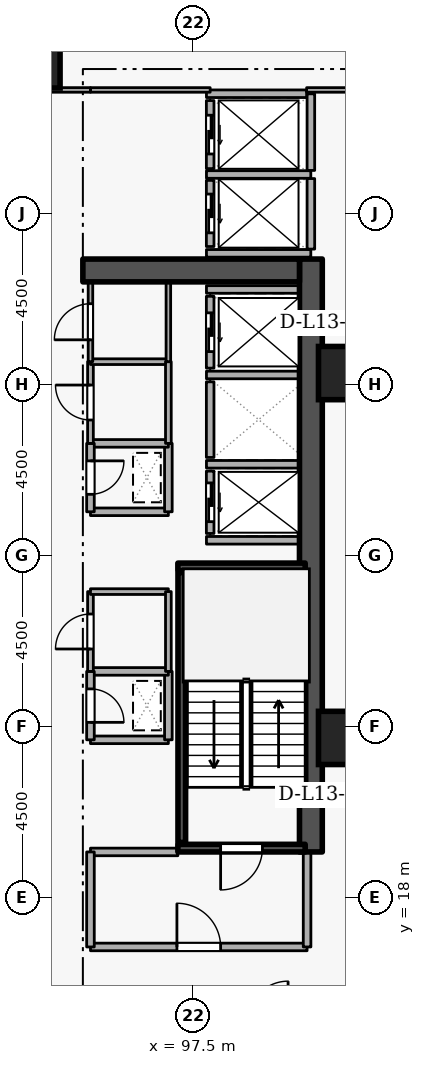
"""IFC4 building model, lengths in metres.
Left out: names, types, materials, properties, quantities, classifications, styles, units other than length and angle.
Written with IfcOpenShell. Run it as: python <this file> out.ifc"""

import sys

from ifc_helpers import new_model, si_unit, direction, frame, frame_2d, origin, origin_2d, place, context, subcontext, project, spatial, rectangle, extrude, element, fill, save


model = new_model("IFC4")
c1 = context("Model", 3, precision=1e-05, world=origin(), true_north=direction((0.0, 1.0)))
c2 = subcontext(c1, "Body", "Model", "MODEL_VIEW")
j1 = project(units=[si_unit("LENGTHUNIT", "METRE"), si_unit("PLANEANGLEUNIT", "RADIAN")], contexts=[c1])
p1 = place(None, origin())
s1 = spatial("IfcSite", under=j1, at=p1, CompositionType="ELEMENT")
p2 = place(p1, origin())
s2 = spatial("IfcBuilding", under=s1, at=p2, CompositionType="ELEMENT")
p3 = place(p2, frame((0.0, 0.0, 53.7)))
s3 = spatial("IfcBuildingStorey", under=s2, at=p3, CompositionType="ELEMENT", Elevation=53.7)
p4 = place(p3, frame((100.6, 19.2, 0.0), z_axis=(0.0, 0.0, 1.0), x_axis=(0.0, 1.0, 0.0)))
e1 = element("IfcWall", 1, at=p4, inside=s3, PredefinedType="SHEAR", context=c2, shape_type="SweptSolid", body=[
    extrude(rectangle(XDim=15.6, YDim=0.6, at=frame_2d((7.8, 0.0))), origin(), (0.0, 0.0, 1.0), 3.6),
])
p5 = place(p3, frame((94.6, 34.5, 0.0), z_axis=(0.0, 0.0, 1.0), x_axis=(1.0, 0.0, 0.0)))
e2 = element("IfcWall", 2, at=p5, inside=s3, PredefinedType="SHEAR", context=c2, shape_type="SweptSolid", body=[
    extrude(rectangle(XDim=5.7, YDim=0.6, at=frame_2d((2.85, 0.0))), origin(), (0.0, 0.0, 1.0), 3.6),
])
for number, where, z_axis, x_axis in (
    (3, (93.3, 40.0, 0.0), (0.0, 0.0, 1.0), (1.0, 0.0, 0.0)),
    (4, (101.5, 22.2, 0.0), (0.0, 0.0, 1.0), (1.0, 0.0, 0.0)),
    (5, (101.5, 31.8, 0.0), (0.0, 0.0, 1.0), (1.0, 0.0, 0.0)),
):
    element("IfcColumn", number, at=place(p3, frame(where, z_axis=z_axis, x_axis=x_axis)), inside=s3, PredefinedType="COLUMN", context=c2, shape_type="SweptSolid", body=[
        extrude(rectangle(XDim=1.4, YDim=1.4, at=origin_2d()), origin(), (0.0, 0.0, 1.0), 3.6),
    ])
p6 = place(p3, frame((97.95, 29.22, 0.0), z_axis=(0.0, 0.0, 1.0), x_axis=(0.0, -1.0, 0.0)))
e6 = element("IfcWall", 6, at=p6, inside=s3, PredefinedType="STANDARD", context=c2, shape_type="SweptSolid", body=[
    extrude(rectangle(XDim=1.64, YDim=0.2, at=frame_2d((0.82, 0.0))), origin(), (0.0, 0.0, 1.0), 3.34),
])
p7 = place(p6, frame((0.31, 0.0, 0.0)))
e7 = element("IfcOpeningElement", 7, at=p7, cuts=e6, PredefinedType="OPENING", context=c2, shape_type="SweptSolid", body=[
    extrude(rectangle(XDim=1.02, YDim=2.06, at=frame_2d((0.51, 1.03))), frame((0.0, 0.11, 0.0), z_axis=(0.0, -1.0, 0.0), x_axis=(1.0, 0.0, 0.0)), (0.0, 0.0, 1.0), 0.22),
])
p8 = place(p3, frame((97.95, 31.57, 0.0), z_axis=(0.0, 0.0, 1.0), x_axis=(0.0, -1.0, 0.0)))
e8 = element("IfcWall", 8, at=p8, inside=s3, PredefinedType="STANDARD", context=c2, shape_type="SweptSolid", body=[
    extrude(rectangle(XDim=1.99, YDim=0.2, at=frame_2d((0.995, 0.0))), origin(), (0.0, 0.0, 1.0), 3.34),
])
p9 = place(p3, frame((97.95, 33.82, 0.0), z_axis=(0.0, 0.0, 1.0), x_axis=(0.0, -1.0, 0.0)))
e9 = element("IfcWall", 9, at=p9, inside=s3, PredefinedType="STANDARD", context=c2, shape_type="SweptSolid", body=[
    extrude(rectangle(XDim=1.89, YDim=0.2, at=frame_2d((0.945, 0.0))), origin(), (0.0, 0.0, 1.0), 3.34),
])
p10 = place(p9, frame((0.435, 0.0, 0.0)))
e10 = element("IfcOpeningElement", 10, at=p10, cuts=e9, PredefinedType="OPENING", context=c2, shape_type="SweptSolid", body=[
    extrude(rectangle(XDim=1.02, YDim=2.06, at=frame_2d((0.51, 1.03))), frame((0.0, 0.11, 0.0), z_axis=(0.0, -1.0, 0.0), x_axis=(1.0, 0.0, 0.0)), (0.0, 0.0, 1.0), 0.22),
])
p11 = place(p3, frame((97.95, 36.87, 0.0), z_axis=(0.0, 0.0, 1.0), x_axis=(0.0, -1.0, 0.0)))
e11 = element("IfcWall", 11, at=p11, inside=s3, PredefinedType="STANDARD", context=c2, shape_type="SweptSolid", body=[
    extrude(rectangle(XDim=1.74, YDim=0.2, at=frame_2d((0.87, 0.0))), origin(), (0.0, 0.0, 1.0), 3.34),
])
p12 = place(p11, frame((0.36, 0.0, 0.0)))
e12 = element("IfcOpeningElement", 12, at=p12, cuts=e11, PredefinedType="OPENING", context=c2, shape_type="SweptSolid", body=[
    extrude(rectangle(XDim=1.02, YDim=2.06, at=frame_2d((0.51, 1.03))), frame((0.0, 0.11, 0.0), z_axis=(0.0, -1.0, 0.0), x_axis=(1.0, 0.0, 0.0)), (0.0, 0.0, 1.0), 0.22),
])
p13 = place(p3, frame((97.95, 38.97, 0.0), z_axis=(0.0, 0.0, 1.0), x_axis=(0.0, -1.0, 0.0)))
e13 = element("IfcWall", 13, at=p13, inside=s3, PredefinedType="STANDARD", context=c2, shape_type="SweptSolid", body=[
    extrude(rectangle(XDim=1.79, YDim=0.2, at=frame_2d((0.895, 0.0))), origin(), (0.0, 0.0, 1.0), 3.34),
])
p14 = place(p13, frame((0.385, 0.0, 0.0)))
e14 = element("IfcOpeningElement", 14, at=p14, cuts=e13, PredefinedType="OPENING", context=c2, shape_type="SweptSolid", body=[
    extrude(rectangle(XDim=1.02, YDim=2.06, at=frame_2d((0.51, 1.03))), frame((0.0, 0.11, 0.0), z_axis=(0.0, -1.0, 0.0), x_axis=(1.0, 0.0, 0.0)), (0.0, 0.0, 1.0), 0.22),
])
for number, where, z_axis, x_axis in (
    (15, (97.852, 29.4, 0.0), (0.0, 0.0, 1.0), (1.0, 0.0, 0.0)),
    (16, (97.852, 27.4, 0.0), (0.0, 0.0, 1.0), (1.0, 0.0, 0.0)),
    (17, (97.852, 31.75, 0.0), (0.0, 0.0, 1.0), (1.0, 0.0, 0.0)),
    (18, (97.852, 34.0, 0.0), (0.0, 0.0, 1.0), (1.0, 0.0, 0.0)),
):
    element("IfcWall", number, at=place(p3, frame(where, z_axis=z_axis, x_axis=x_axis)), inside=s3, PredefinedType="STANDARD", context=c2, shape_type="SweptSolid", body=[
        extrude(rectangle(XDim=2.436, YDim=0.2, at=frame_2d((1.218, 0.0))), origin(), (0.0, 0.0, 1.0), 3.34),
    ])
for number, where, z_axis, x_axis in (
    (19, (97.852, 37.025, 0.0), (0.0, 0.0, 1.0), (1.0, 0.0, 0.0)),
    (20, (97.852, 34.95, 0.0), (0.0, 0.0, 1.0), (1.0, 0.0, 0.0)),
):
    element("IfcWall", number, at=place(p3, frame(where, z_axis=z_axis, x_axis=x_axis)), inside=s3, PredefinedType="STANDARD", context=c2, shape_type="SweptSolid", body=[
        extrude(rectangle(XDim=2.746, YDim=0.2, at=frame_2d((1.373, 0.0))), origin(), (0.0, 0.0, 1.0), 3.34),
    ])
p15 = place(p3, frame((100.6, 35.062, 0.0), z_axis=(0.0, 0.0, 1.0), x_axis=(0.0, 1.0, 0.0)))
e21 = element("IfcWall", 21, at=p15, inside=s3, PredefinedType="STANDARD", context=c2, shape_type="SweptSolid", body=[
    extrude(rectangle(XDim=1.856, YDim=0.2, at=frame_2d((0.928, 0.0))), origin(), (0.0, 0.0, 1.0), 3.34),
])
p16 = place(p3, frame((100.6, 37.132, 0.0), z_axis=(0.0, 0.0, 1.0), x_axis=(0.0, 1.0, 0.0)))
e22 = element("IfcWall", 22, at=p16, inside=s3, PredefinedType="STANDARD", context=c2, shape_type="SweptSolid", body=[
    extrude(rectangle(XDim=2.016, YDim=0.2, at=frame_2d((1.008, 0.0))), origin(), (0.0, 0.0, 1.0), 3.34),
])
p17 = place(p3, frame((97.852, 39.15, 0.0), z_axis=(0.0, 0.0, 1.0), x_axis=(1.0, 0.0, 0.0)))
e23 = element("IfcWall", 23, at=p17, inside=s3, PredefinedType="STANDARD", context=c2, shape_type="SweptSolid", body=[
    extrude(rectangle(XDim=2.636, YDim=0.2, at=frame_2d((1.318, 0.0))), origin(), (0.0, 0.0, 1.0), 3.34),
])
p18 = place(p3, frame((100.45, 19.3, 0.0), z_axis=(0.0, 0.0, 1.0), x_axis=(-1.0, 0.0, 0.0)))
e24 = element("IfcWall", 24, at=p18, inside=s3, PredefinedType="SHEAR", context=c2, shape_type="SweptSolid", body=[
    extrude(rectangle(XDim=3.35, YDim=0.2, at=frame_2d((1.675, 0.0))), origin(), (0.0, 0.0, 1.0), 3.6),
])
p19 = place(p18, frame((1.125, 0.0, 0.0)))
e25 = element("IfcOpeningElement", 25, at=p19, cuts=e24, PredefinedType="OPENING", context=c2, shape_type="SweptSolid", body=[
    extrude(rectangle(XDim=1.1, YDim=2.1, at=frame_2d((0.55, 1.05))), frame((0.0, 0.11, 0.0), z_axis=(0.0, -1.0, 0.0), x_axis=(1.0, 0.0, 0.0)), (0.0, 0.0, 1.0), 0.22),
])
p20 = place(p3, frame((97.1, 26.7, 0.0), z_axis=(0.0, 0.0, 1.0), x_axis=(1.0, 0.0, 0.0)))
e26 = element("IfcWall", 26, at=p20, inside=s3, PredefinedType="SHEAR", context=c2, shape_type="SweptSolid", body=[
    extrude(rectangle(XDim=3.35, YDim=0.2, at=frame_2d((1.675, 0.0))), origin(), (0.0, 0.0, 1.0), 3.6),
])
p21 = place(p3, frame((97.203, 26.55, 0.0), z_axis=(0.0, 0.0, 1.0), x_axis=(0.0, -1.0, 0.0)))
e27 = element("IfcWall", 27, at=p21, inside=s3, PredefinedType="SHEAR", context=c2, shape_type="SweptSolid", body=[
    extrude(rectangle(XDim=7.1, YDim=0.2, at=frame_2d((3.55, 0.0))), origin(), (0.0, 0.0, 1.0), 3.6),
])
p22 = place(p3, frame((94.8, 16.7, 0.0), z_axis=(0.0, 0.0, 1.0), x_axis=(1.0, 0.0, 0.0)))
e28 = element("IfcWall", 28, at=p22, inside=s3, PredefinedType="STANDARD", context=c2, shape_type="SweptSolid", body=[
    extrude(rectangle(XDim=5.7, YDim=0.2, at=frame_2d((2.85, 0.0))), origin(), (0.0, 0.0, 1.0), 3.34),
])
p23 = place(p22, frame((2.275, 0.0, 0.0)))
e29 = element("IfcOpeningElement", 29, at=p23, cuts=e28, PredefinedType="OPENING", context=c2, shape_type="SweptSolid", body=[
    extrude(rectangle(XDim=1.15, YDim=2.1, at=frame_2d((0.575, 1.05))), frame((0.0, 0.11, 0.0), z_axis=(0.0, -1.0, 0.0), x_axis=(1.0, 0.0, 0.0)), (0.0, 0.0, 1.0), 0.22),
])
p24 = place(p3, frame((100.5, 16.7, 0.0), z_axis=(0.0, 0.0, 1.0), x_axis=(0.0, 1.0, 0.0)))
e30 = element("IfcWall", 30, at=p24, inside=s3, PredefinedType="STANDARD", context=c2, shape_type="SweptSolid", body=[
    extrude(rectangle(XDim=2.5, YDim=0.2, at=frame_2d((1.25, 0.0))), origin(), (0.0, 0.0, 1.0), 3.34),
])
p25 = place(p3, frame((97.1, 19.2, 0.0), z_axis=(0.0, 0.0, 1.0), x_axis=(-1.0, 0.0, 0.0)))
e31 = element("IfcWall", 31, at=p25, inside=s3, PredefinedType="STANDARD", context=c2, shape_type="SweptSolid", body=[
    extrude(rectangle(XDim=2.3, YDim=0.2, at=frame_2d((1.15, 0.0))), origin(), (0.0, 0.0, 1.0), 2.545),
])
p26 = place(p3, frame((94.8, 19.2, 0.0), z_axis=(0.0, 0.0, 1.0), x_axis=(0.0, -1.0, 0.0)))
e32 = element("IfcWall", 32, at=p26, inside=s3, PredefinedType="STANDARD", context=c2, shape_type="SweptSolid", body=[
    extrude(rectangle(XDim=2.5, YDim=0.2, at=frame_2d((1.25, 0.0))), origin(), (0.0, 0.0, 1.0), 3.34),
])
p27 = place(p3, frame((94.8, 28.15, 0.0), z_axis=(0.0, 0.0, 1.0), x_axis=(1.0, 0.0, 0.0)))
e33 = element("IfcWall", 33, at=p27, inside=s3, PredefinedType="STANDARD", context=c2, shape_type="SweptSolid", body=[
    extrude(rectangle(XDim=2.05, YDim=0.2, at=frame_2d((1.025, 0.0))), origin(), (0.0, 0.0, 1.0), 3.34),
])
p28 = place(p3, frame((96.85, 28.15, 0.0), z_axis=(0.0, 0.0, 1.0), x_axis=(0.0, 1.0, 0.0)))
e34 = element("IfcWall", 34, at=p28, inside=s3, PredefinedType="STANDARD", context=c2, shape_type="SweptSolid", body=[
    extrude(rectangle(XDim=1.8, YDim=0.2, at=frame_2d((0.9, 0.0))), origin(), (0.0, 0.0, 1.0), 3.34),
])
p29 = place(p3, frame((96.85, 29.95, 0.0), z_axis=(0.0, 0.0, 1.0), x_axis=(-1.0, 0.0, 0.0)))
e35 = element("IfcWall", 35, at=p29, inside=s3, PredefinedType="STANDARD", context=c2, shape_type="SweptSolid", body=[
    extrude(rectangle(XDim=2.05, YDim=0.2, at=frame_2d((1.025, 0.0))), origin(), (0.0, 0.0, 1.0), 3.34),
])
p30 = place(p3, frame((94.8, 29.95, 0.0), z_axis=(0.0, 0.0, 1.0), x_axis=(0.0, -1.0, 0.0)))
e36 = element("IfcWall", 36, at=p30, inside=s3, PredefinedType="STANDARD", context=c2, shape_type="SweptSolid", body=[
    extrude(rectangle(XDim=1.8, YDim=0.2, at=frame_2d((0.9, 0.0))), origin(), (0.0, 0.0, 1.0), 3.34),
])
p31 = place(p30, frame((0.46, 0.0, 0.0)))
e37 = element("IfcOpeningElement", 37, at=p31, cuts=e36, PredefinedType="OPENING", context=c2, shape_type="SweptSolid", body=[
    extrude(rectangle(XDim=0.88, YDim=2.04, at=frame_2d((0.44, 1.02))), frame((0.0, 0.11, 0.0), z_axis=(0.0, -1.0, 0.0), x_axis=(1.0, 0.0, 0.0)), (0.0, 0.0, 1.0), 0.22),
])
p32 = place(p3, frame((94.8, 22.15, 0.0), z_axis=(0.0, 0.0, 1.0), x_axis=(1.0, 0.0, 0.0)))
e38 = element("IfcWall", 38, at=p32, inside=s3, PredefinedType="STANDARD", context=c2, shape_type="SweptSolid", body=[
    extrude(rectangle(XDim=2.05, YDim=0.2, at=frame_2d((1.025, 0.0))), origin(), (0.0, 0.0, 1.0), 3.34),
])
p33 = place(p3, frame((96.85, 22.15, 0.0), z_axis=(0.0, 0.0, 1.0), x_axis=(0.0, 1.0, 0.0)))
e39 = element("IfcWall", 39, at=p33, inside=s3, PredefinedType="STANDARD", context=c2, shape_type="SweptSolid", body=[
    extrude(rectangle(XDim=1.8, YDim=0.2, at=frame_2d((0.9, 0.0))), origin(), (0.0, 0.0, 1.0), 3.34),
])
p34 = place(p3, frame((96.85, 23.95, 0.0), z_axis=(0.0, 0.0, 1.0), x_axis=(-1.0, 0.0, 0.0)))
e40 = element("IfcWall", 40, at=p34, inside=s3, PredefinedType="STANDARD", context=c2, shape_type="SweptSolid", body=[
    extrude(rectangle(XDim=2.05, YDim=0.2, at=frame_2d((1.025, 0.0))), origin(), (0.0, 0.0, 1.0), 3.34),
])
p35 = place(p3, frame((94.8, 23.95, 0.0), z_axis=(0.0, 0.0, 1.0), x_axis=(0.0, -1.0, 0.0)))
e41 = element("IfcWall", 41, at=p35, inside=s3, PredefinedType="STANDARD", context=c2, shape_type="SweptSolid", body=[
    extrude(rectangle(XDim=1.8, YDim=0.2, at=frame_2d((0.9, 0.0))), origin(), (0.0, 0.0, 1.0), 3.34),
])
p36 = place(p35, frame((0.46, 0.0, 0.0)))
e42 = element("IfcOpeningElement", 42, at=p36, cuts=e41, PredefinedType="OPENING", context=c2, shape_type="SweptSolid", body=[
    extrude(rectangle(XDim=0.88, YDim=2.04, at=frame_2d((0.44, 1.02))), frame((0.0, 0.11, 0.0), z_axis=(0.0, -1.0, 0.0), x_axis=(1.0, 0.0, 0.0)), (0.0, 0.0, 1.0), 0.22),
])
p37 = place(p3, frame((94.8, 23.95, 0.0), z_axis=(0.0, 0.0, 1.0), x_axis=(0.0, 1.0, 0.0)))
e43 = element("IfcWall", 43, at=p37, inside=s3, PredefinedType="PARTITIONING", context=c2, shape_type="SweptSolid", body=[
    extrude(rectangle(XDim=2.1, YDim=0.15, at=frame_2d((1.05, 0.0))), origin(), (0.0, 0.0, 1.0), 3.34),
])
p38 = place(p37, frame((0.59, 0.0, 0.0)))
e44 = element("IfcOpeningElement", 44, at=p38, cuts=e43, PredefinedType="OPENING", context=c2, shape_type="SweptSolid", body=[
    extrude(rectangle(XDim=0.92, YDim=2.08, at=frame_2d((0.46, 1.04))), frame((0.0, 0.085, 0.0), z_axis=(0.0, -1.0, 0.0), x_axis=(1.0, 0.0, 0.0)), (0.0, 0.0, 1.0), 0.17),
])
p39 = place(p3, frame((94.8, 26.05, 0.0), z_axis=(0.0, 0.0, 1.0), x_axis=(1.0, 0.0, 0.0)))
e45 = element("IfcWall", 45, at=p39, inside=s3, PredefinedType="PARTITIONING", context=c2, shape_type="SweptSolid", body=[
    extrude(rectangle(XDim=2.05, YDim=0.15, at=frame_2d((1.025, 0.0))), origin(), (0.0, 0.0, 1.0), 3.34),
])
p40 = place(p3, frame((96.85, 26.05, 0.0), z_axis=(0.0, 0.0, 1.0), x_axis=(0.0, -1.0, 0.0)))
e46 = element("IfcWall", 46, at=p40, inside=s3, PredefinedType="PARTITIONING", context=c2, shape_type="SweptSolid", body=[
    extrude(rectangle(XDim=2.1, YDim=0.15, at=frame_2d((1.05, 0.0))), origin(), (0.0, 0.0, 1.0), 3.34),
])
p41 = place(p3, frame((94.8, 29.95, 0.0), z_axis=(0.0, 0.0, 1.0), x_axis=(0.0, 1.0, 0.0)))
e47 = element("IfcWall", 47, at=p41, inside=s3, PredefinedType="PARTITIONING", context=c2, shape_type="SweptSolid", body=[
    extrude(rectangle(XDim=2.15, YDim=0.15, at=frame_2d((1.075, 0.0))), origin(), (0.0, 0.0, 1.0), 3.34),
])
p42 = place(p41, frame((0.615, 0.0, 0.0)))
e48 = element("IfcOpeningElement", 48, at=p42, cuts=e47, PredefinedType="OPENING", context=c2, shape_type="SweptSolid", body=[
    extrude(rectangle(XDim=0.92, YDim=2.08, at=frame_2d((0.46, 1.04))), frame((0.0, 0.085, 0.0), z_axis=(0.0, -1.0, 0.0), x_axis=(1.0, 0.0, 0.0)), (0.0, 0.0, 1.0), 0.17),
])
p43 = place(p3, frame((94.8, 32.1, 0.0), z_axis=(0.0, 0.0, 1.0), x_axis=(1.0, 0.0, 0.0)))
e49 = element("IfcWall", 49, at=p43, inside=s3, PredefinedType="PARTITIONING", context=c2, shape_type="SweptSolid", body=[
    extrude(rectangle(XDim=2.05, YDim=0.15, at=frame_2d((1.025, 0.0))), origin(), (0.0, 0.0, 1.0), 3.34),
])
p44 = place(p3, frame((96.85, 32.1, 0.0), z_axis=(0.0, 0.0, 1.0), x_axis=(0.0, -1.0, 0.0)))
e50 = element("IfcWall", 50, at=p44, inside=s3, PredefinedType="PARTITIONING", context=c2, shape_type="SweptSolid", body=[
    extrude(rectangle(XDim=2.15, YDim=0.15, at=frame_2d((1.075, 0.0))), origin(), (0.0, 0.0, 1.0), 3.34),
])
p45 = place(p3, frame((94.8, 32.1, 0.0), z_axis=(0.0, 0.0, 1.0), x_axis=(0.0, 1.0, 0.0)))
e51 = element("IfcWall", 51, at=p45, inside=s3, PredefinedType="PARTITIONING", context=c2, shape_type="SweptSolid", body=[
    extrude(rectangle(XDim=2.1, YDim=0.12, at=frame_2d((1.05, 0.0))), origin(), (0.0, 0.0, 1.0), 3.34),
])
p46 = place(p45, frame((0.575, 0.0, 0.0)))
e52 = element("IfcOpeningElement", 52, at=p46, cuts=e51, PredefinedType="OPENING", context=c2, shape_type="SweptSolid", body=[
    extrude(rectangle(XDim=0.95, YDim=2.1, at=frame_2d((0.475, 1.05))), frame((0.0, 0.07, 0.0), z_axis=(0.0, -1.0, 0.0), x_axis=(1.0, 0.0, 0.0)), (0.0, 0.0, 1.0), 0.14),
])
p47 = place(p3, frame((96.85, 34.2, 0.0), z_axis=(0.0, 0.0, 1.0), x_axis=(0.0, -1.0, 0.0)))
e53 = element("IfcWall", 53, at=p47, inside=s3, PredefinedType="PARTITIONING", context=c2, shape_type="SweptSolid", body=[
    extrude(rectangle(XDim=2.1, YDim=0.12, at=frame_2d((1.05, 0.0))), origin(), (0.0, 0.0, 1.0), 3.34),
])
p48 = place(p3, frame((97.95, 39.25, 0.0), z_axis=(0.0, 0.0, 1.0), x_axis=(-1.0, 0.0, 0.0)))
e54 = element("IfcWall", 54, at=p48, inside=s3, PredefinedType="PARTITIONING", context=c2, shape_type="SweptSolid", body=[
    extrude(rectangle(XDim=3.15, YDim=0.12, at=frame_2d((1.575, 0.0))), origin(), (0.0, 0.0, 1.0), 3.34),
])
p49 = place(p3, frame((94.8, 39.25, 0.0), z_axis=(0.0, 0.0, 1.0), x_axis=(-1.0, 0.0, 0.0)))
e55 = element("IfcWall", 55, at=p49, inside=s3, PredefinedType="PARTITIONING", context=c2, shape_type="SweptSolid", body=[
    extrude(rectangle(XDim=1.85, YDim=0.12, at=frame_2d((0.925, 0.0))), origin(), (0.0, 0.0, 1.0), 3.34),
])
p50 = place(p3, frame((102.35, 39.25, 0.0), z_axis=(0.0, 0.0, 1.0), x_axis=(-1.0, 0.0, 0.0)))
e56 = element("IfcWall", 56, at=p50, inside=s3, PredefinedType="PARTITIONING", context=c2, shape_type="SweptSolid", body=[
    extrude(rectangle(XDim=1.862, YDim=0.12, at=frame_2d((0.931, 0.0))), origin(), (0.0, 0.0, 1.0), 3.34),
])
p51 = place(p7, origin())
e57 = element("IfcDoor", 57, at=p51, inside=s3, OperationType="SLIDING_TO_LEFT", PredefinedType="DOOR", context=c2, shape_type="SweptSolid", body=[
    extrude(rectangle(XDim=1.02, YDim=2.06, at=frame_2d((0.51, 1.03))), frame((0.0, 0.025, 0.0), z_axis=(0.0, -1.0, 0.0), x_axis=(1.0, 0.0, 0.0)), (0.0, 0.0, 1.0), 0.05),
])
fill(e7, e57)
p52 = place(p10, origin())
e58 = element("IfcDoor", 58, at=p52, inside=s3, OperationType="SLIDING_TO_LEFT", PredefinedType="DOOR", context=c2, shape_type="SweptSolid", body=[
    extrude(rectangle(XDim=1.02, YDim=2.06, at=frame_2d((0.51, 1.03))), frame((0.0, 0.025, 0.0), z_axis=(0.0, -1.0, 0.0), x_axis=(1.0, 0.0, 0.0)), (0.0, 0.0, 1.0), 0.05),
])
fill(e10, e58)
p53 = place(p12, origin())
e59 = element("IfcDoor", 59, at=p53, inside=s3, OperationType="SLIDING_TO_LEFT", PredefinedType="DOOR", context=c2, shape_type="SweptSolid", body=[
    extrude(rectangle(XDim=1.02, YDim=2.06, at=frame_2d((0.51, 1.03))), frame((0.0, 0.025, 0.0), z_axis=(0.0, -1.0, 0.0), x_axis=(1.0, 0.0, 0.0)), (0.0, 0.0, 1.0), 0.05),
])
fill(e12, e59)
p54 = place(p14, origin())
e60 = element("IfcDoor", 60, at=p54, inside=s3, OperationType="SLIDING_TO_LEFT", PredefinedType="DOOR", context=c2, shape_type="SweptSolid", body=[
    extrude(rectangle(XDim=1.02, YDim=2.06, at=frame_2d((0.51, 1.03))), frame((0.0, 0.025, 0.0), z_axis=(0.0, -1.0, 0.0), x_axis=(1.0, 0.0, 0.0)), (0.0, 0.0, 1.0), 0.05),
])
fill(e14, e60)
p55 = place(p19, origin())
e61 = element("IfcDoor", 61, at=p55, inside=s3, OperationType="SINGLE_SWING_RIGHT", PredefinedType="DOOR", context=c2, shape_type="SweptSolid", body=[
    extrude(rectangle(XDim=1.1, YDim=2.1, at=frame_2d((0.55, 1.05))), frame((0.0, 0.025, 0.0), z_axis=(0.0, -1.0, 0.0), x_axis=(1.0, 0.0, 0.0)), (0.0, 0.0, 1.0), 0.05),
])
fill(e25, e61)
p56 = place(p23, origin())
e62 = element("IfcDoor", 62, at=p56, inside=s3, OperationType="SINGLE_SWING_LEFT", PredefinedType="DOOR", context=c2, shape_type="SweptSolid", body=[
    extrude(rectangle(XDim=1.15, YDim=2.1, at=frame_2d((0.575, 1.05))), frame((0.0, 0.025, 0.0), z_axis=(0.0, -1.0, 0.0), x_axis=(1.0, 0.0, 0.0)), (0.0, 0.0, 1.0), 0.05),
])
fill(e29, e62)
p57 = place(p31, origin())
e63 = element("IfcDoor", 63, at=p57, inside=s3, OperationType="SINGLE_SWING_LEFT", PredefinedType="DOOR", context=c2, shape_type="SweptSolid", body=[
    extrude(rectangle(XDim=0.88, YDim=2.04, at=frame_2d((0.44, 1.02))), frame((0.0, 0.025, 0.0), z_axis=(0.0, -1.0, 0.0), x_axis=(1.0, 0.0, 0.0)), (0.0, 0.0, 1.0), 0.05),
])
fill(e37, e63)
p58 = place(p36, origin())
e64 = element("IfcDoor", 64, at=p58, inside=s3, OperationType="SINGLE_SWING_RIGHT", PredefinedType="DOOR", context=c2, shape_type="SweptSolid", body=[
    extrude(rectangle(XDim=0.88, YDim=2.04, at=frame_2d((0.44, 1.02))), frame((0.0, 0.025, 0.0), z_axis=(0.0, -1.0, 0.0), x_axis=(1.0, 0.0, 0.0)), (0.0, 0.0, 1.0), 0.05),
])
fill(e42, e64)
p59 = place(p38, origin())
e65 = element("IfcDoor", 65, at=p59, inside=s3, OperationType="SINGLE_SWING_LEFT", PredefinedType="DOOR", context=c2, shape_type="SweptSolid", body=[
    extrude(rectangle(XDim=0.92, YDim=2.08, at=frame_2d((0.46, 1.04))), frame((0.0, 0.025, 0.0), z_axis=(0.0, -1.0, 0.0), x_axis=(1.0, 0.0, 0.0)), (0.0, 0.0, 1.0), 0.05),
])
fill(e44, e65)
p60 = place(p42, origin())
e66 = element("IfcDoor", 66, at=p60, inside=s3, OperationType="SINGLE_SWING_RIGHT", PredefinedType="DOOR", context=c2, shape_type="SweptSolid", body=[
    extrude(rectangle(XDim=0.92, YDim=2.08, at=frame_2d((0.46, 1.04))), frame((0.0, 0.025, 0.0), z_axis=(0.0, -1.0, 0.0), x_axis=(1.0, 0.0, 0.0)), (0.0, 0.0, 1.0), 0.05),
])
fill(e48, e66)
p61 = place(p46, origin())
e67 = element("IfcDoor", 67, at=p61, inside=s3, OperationType="SINGLE_SWING_LEFT", PredefinedType="DOOR", context=c2, shape_type="SweptSolid", body=[
    extrude(rectangle(XDim=0.95, YDim=2.1, at=frame_2d((0.475, 1.05))), frame((0.0, 0.025, 0.0), z_axis=(0.0, -1.0, 0.0), x_axis=(1.0, 0.0, 0.0)), (0.0, 0.0, 1.0), 0.05),
])
fill(e52, e67)
save(model, sys.argv[1])
